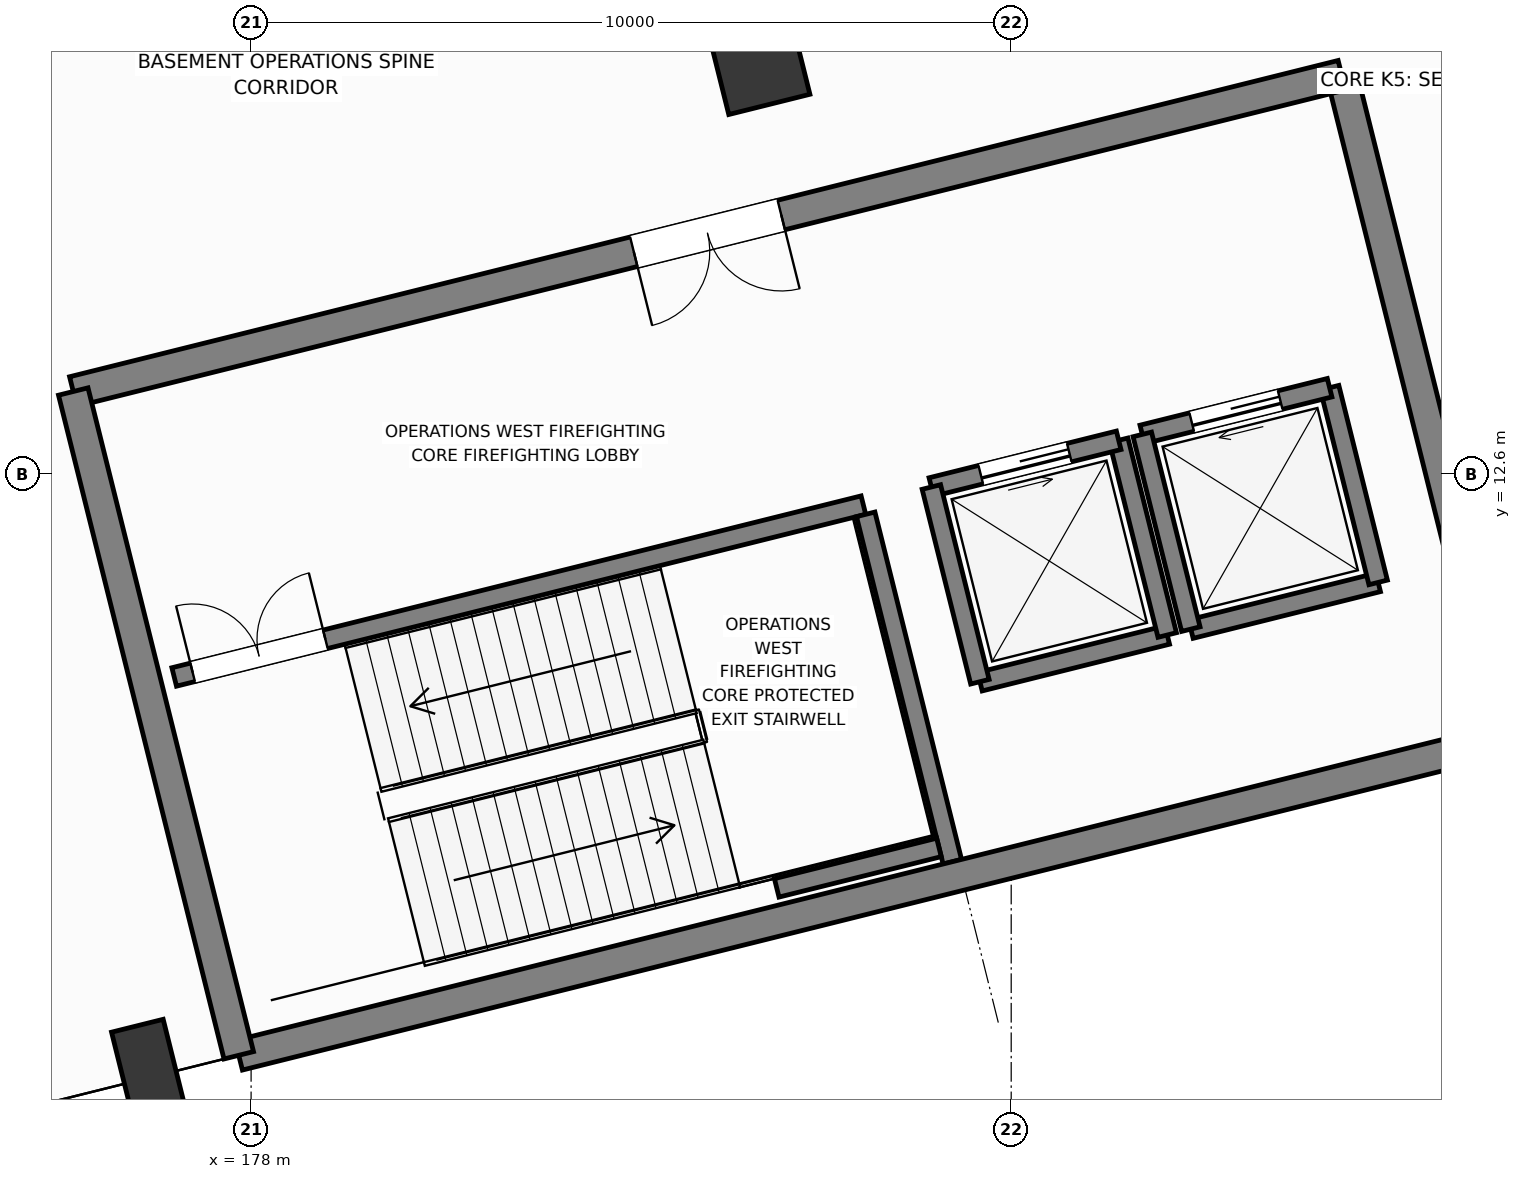
"""IFC4 building model, lengths in metres.
Left out: names, types, materials, properties, quantities, classifications, styles, units other than length and angle.
Written with IfcOpenShell. Run it as: python <this file> out.ifc"""

import sys

from ifc_helpers import new_model, si_unit, direction, frame, frame_2d, origin, origin_2d, place, context, subcontext, project, spatial, rectangle, extrude, element, fill, save


model = new_model("IFC4")
c1 = context("Model", 3, precision=1e-05, world=origin(), true_north=direction((0.0, 1.0)))
c2 = subcontext(c1, "Body", "Model", "MODEL_VIEW")
j1 = project(units=[si_unit("LENGTHUNIT", "METRE"), si_unit("PLANEANGLEUNIT", "RADIAN")], contexts=[c1])
p1 = place(None, origin())
s1 = spatial("IfcSite", under=j1, at=p1, CompositionType="ELEMENT")
p2 = place(p1, origin())
s2 = spatial("IfcBuilding", under=s1, at=p2, CompositionType="ELEMENT")
p3 = place(p2, frame((0.0, 0.0, -5.4)))
s3 = spatial("IfcBuildingStorey", under=s2, at=p3, CompositionType="ELEMENT", Elevation=-5.4)
p4 = place(p3, frame((176.673, 4.661, 0.0), z_axis=(0.0, 0.0, 1.0), x_axis=(0.970295726276, 0.2419218956, 0.0)))
e1 = element("IfcColumn", 1, at=p4, inside=s3, PredefinedType="COLUMN", context=c2, shape_type="SweptSolid", body=[
    extrude(rectangle(XDim=0.7, YDim=1.4, at=origin_2d()), origin(), (0.0, 0.0, 1.0), 5.4),
])
p5 = place(p3, frame((184.685, 17.995, 0.0), z_axis=(0.0, 0.0, 1.0), x_axis=(0.970295726276, 0.2419218956, 0.0)))
e2 = element("IfcColumn", 2, at=p5, inside=s3, PredefinedType="COLUMN", context=c2, shape_type="SweptSolid", body=[
    extrude(rectangle(XDim=1.1, YDim=1.1, at=origin_2d()), origin(), (0.0, 0.0, 1.0), 5.4),
])
p6 = place(p3, frame((187.588, 9.866, 0.0), z_axis=(0.0, 0.0, 1.0), x_axis=(0.97029284861, 0.241933436994, 0.0)))
e3 = element("IfcWall", 3, at=p6, inside=s3, PredefinedType="SOLIDWALL", context=c2, shape_type="SweptSolid", body=[
    extrude(rectangle(XDim=2.54, YDim=0.25, at=frame_2d((1.27, 0.0))), origin(), (0.0, 0.0, 1.0), 5.02),
])
p7 = place(p3, frame((190.053, 10.481, 0.0), z_axis=(0.0, 0.0, 1.0), x_axis=(-0.241938414856, 0.970291607413, 0.0)))
e4 = element("IfcWall", 4, at=p7, inside=s3, PredefinedType="SOLIDWALL", context=c2, shape_type="SweptSolid", body=[
    extrude(rectangle(XDim=2.64, YDim=0.25, at=frame_2d((1.32, 0.0))), origin(), (0.0, 0.0, 1.0), 5.02),
])
p8 = place(p3, frame((189.414, 13.042, 0.0), z_axis=(0.0, 0.0, 1.0), x_axis=(-0.97029284861, -0.241933436994, 0.0)))
e5 = element("IfcWall", 5, at=p8, inside=s3, PredefinedType="SOLIDWALL", context=c2, shape_type="SweptSolid", body=[
    extrude(rectangle(XDim=2.54, YDim=0.25, at=frame_2d((1.27, 0.0))), origin(), (0.0, 0.0, 1.0), 5.02),
])
p9 = place(p8, frame((0.67, 0.0, 0.0)))
e6 = element("IfcOpeningElement", 6, at=p9, cuts=e5, PredefinedType="OPENING", context=c2, shape_type="SweptSolid", body=[
    extrude(rectangle(XDim=1.2, YDim=2.2, at=frame_2d((0.6, 1.1))), frame((0.0, 0.135, 0.0), z_axis=(0.0, -1.0, 0.0), x_axis=(1.0, 0.0, 0.0)), (0.0, 0.0, 1.0), 0.27),
])
p10 = place(p3, frame((186.95, 12.428, 0.0), z_axis=(0.0, 0.0, 1.0), x_axis=(0.241938414856, -0.970291607413, 0.0)))
e7 = element("IfcWall", 7, at=p10, inside=s3, PredefinedType="SOLIDWALL", context=c2, shape_type="SweptSolid", body=[
    extrude(rectangle(XDim=2.64, YDim=0.25, at=frame_2d((1.32, 0.0))), origin(), (0.0, 0.0, 1.0), 5.02),
])
p11 = place(p3, frame((190.363, 10.558, 0.0), z_axis=(0.0, 0.0, 1.0), x_axis=(0.97029284861, 0.241933436994, 0.0)))
e8 = element("IfcWall", 8, at=p11, inside=s3, PredefinedType="SOLIDWALL", context=c2, shape_type="SweptSolid", body=[
    extrude(rectangle(XDim=2.54, YDim=0.25, at=frame_2d((1.27, 0.0))), origin(), (0.0, 0.0, 1.0), 5.02),
])
p12 = place(p3, frame((192.828, 11.173, 0.0), z_axis=(0.0, 0.0, 1.0), x_axis=(-0.241938414856, 0.970291607413, 0.0)))
e9 = element("IfcWall", 9, at=p12, inside=s3, PredefinedType="SOLIDWALL", context=c2, shape_type="SweptSolid", body=[
    extrude(rectangle(XDim=2.64, YDim=0.25, at=frame_2d((1.32, 0.0))), origin(), (0.0, 0.0, 1.0), 5.02),
])
p13 = place(p3, frame((192.189, 13.734, 0.0), z_axis=(0.0, 0.0, 1.0), x_axis=(-0.97029284861, -0.241933436994, 0.0)))
e10 = element("IfcWall", 10, at=p13, inside=s3, PredefinedType="SOLIDWALL", context=c2, shape_type="SweptSolid", body=[
    extrude(rectangle(XDim=2.54, YDim=0.25, at=frame_2d((1.27, 0.0))), origin(), (0.0, 0.0, 1.0), 5.02),
])
p14 = place(p13, frame((0.67, 0.0, 0.0)))
e11 = element("IfcOpeningElement", 11, at=p14, cuts=e10, PredefinedType="OPENING", context=c2, shape_type="SweptSolid", body=[
    extrude(rectangle(XDim=1.2, YDim=2.2, at=frame_2d((0.6, 1.1))), frame((0.0, 0.135, 0.0), z_axis=(0.0, -1.0, 0.0), x_axis=(1.0, 0.0, 0.0)), (0.0, 0.0, 1.0), 0.27),
])
p15 = place(p3, frame((189.725, 13.12, 0.0), z_axis=(0.0, 0.0, 1.0), x_axis=(0.241938414856, -0.970291607413, 0.0)))
e12 = element("IfcWall", 12, at=p15, inside=s3, PredefinedType="SOLIDWALL", context=c2, shape_type="SweptSolid", body=[
    extrude(rectangle(XDim=2.64, YDim=0.25, at=frame_2d((1.32, 0.0))), origin(), (0.0, 0.0, 1.0), 5.02),
])
p16 = place(p3, frame((176.988, 9.929, 0.0), z_axis=(0.0, 0.0, 1.0), x_axis=(0.970297151331, 0.241916179943, 0.0)))
e13 = element("IfcWall", 13, at=p16, inside=s3, PredefinedType="SOLIDWALL", context=c2, shape_type="SweptSolid", body=[
    extrude(rectangle(XDim=9.345, YDim=0.25, at=frame_2d((4.673, 0.0))), origin(), (0.0, 0.0, 1.0), 5.02),
])
p17 = place(p16, frame((0.25, 0.0, 0.0)))
e14 = element("IfcOpeningElement", 14, at=p17, cuts=e13, PredefinedType="OPENING", context=c2, shape_type="SweptSolid", body=[
    extrude(rectangle(XDim=1.8, YDim=2.25, at=frame_2d((0.9, 1.125))), frame((0.0, 0.135, 0.0), z_axis=(0.0, -1.0, 0.0), x_axis=(1.0, 0.0, 0.0)), (0.0, 0.0, 1.0), 0.27),
])
p18 = place(p3, frame((187.225, 7.498, 0.0), z_axis=(0.0, 0.0, 1.0), x_axis=(-0.241911120435, 0.970298412763, 0.0)))
e15 = element("IfcWall", 15, at=p18, inside=s3, PredefinedType="SOLIDWALL", context=c2, shape_type="SweptSolid", body=[
    extrude(rectangle(XDim=4.71, YDim=0.25, at=frame_2d((2.355, 0.0))), origin(), (0.0, 0.0, 1.0), 5.02),
])
p19 = place(p3, frame((184.915, 7.154, 0.0), z_axis=(0.0, 0.0, 1.0), x_axis=(0.97029738597, 0.241915238833, 0.0)))
e16 = element("IfcWall", 16, at=p19, inside=s3, PredefinedType="SOLIDWALL", context=c2, shape_type="SweptSolid", body=[
    extrude(rectangle(XDim=2.2, YDim=0.25, at=frame_2d((1.1, 0.0))), origin(), (0.0, 0.0, 1.0), 5.02),
])
p20 = place(p3, frame((177.838, 4.951, 0.0), z_axis=(0.0, 0.0, 1.0), x_axis=(0.970295179998, 0.241924086589, 0.0)))
e17 = element("IfcWall", 17, at=p20, inside=s3, PredefinedType="SHEAR", context=c2, shape_type="SweptSolid", body=[
    extrude(rectangle(XDim=17.2, YDim=0.4, at=frame_2d((8.6, 0.0))), origin(), (0.0, 0.0, 1.0), 5.02),
])
p21 = place(p3, frame((194.527, 9.113, 0.0), z_axis=(0.0, 0.0, 1.0), x_axis=(-0.241923808098, 0.970295249435, 0.0)))
e18 = element("IfcWall", 18, at=p21, inside=s3, PredefinedType="SHEAR", context=c2, shape_type="SweptSolid", body=[
    extrude(rectangle(XDim=9.0, YDim=0.4, at=frame_2d((4.5, 0.0))), origin(), (0.0, 0.0, 1.0), 5.02),
])
p22 = place(p3, frame((192.349, 17.845, 0.0), z_axis=(0.0, 0.0, 1.0), x_axis=(-0.970296544738, -0.241918612906, 0.0)))
e19 = element("IfcWall", 19, at=p22, inside=s3, PredefinedType="SHEAR", context=c2, shape_type="SweptSolid", body=[
    extrude(rectangle(XDim=17.2, YDim=0.4, at=frame_2d((8.6, 0.0))), origin(), (0.0, 0.0, 1.0), 5.02),
])
p23 = place(p22, frame((7.6, 0.0, 0.0)))
e20 = element("IfcOpeningElement", 20, at=p23, cuts=e19, PredefinedType="OPENING", context=c2, shape_type="SweptSolid", body=[
    extrude(rectangle(XDim=2.0, YDim=2.3, at=frame_2d((1.0, 1.15))), frame((0.0, 0.21, 0.0), z_axis=(0.0, -1.0, 0.0), x_axis=(1.0, 0.0, 0.0)), (0.0, 0.0, 1.0), 0.42),
])
p24 = place(p3, frame((175.66, 13.684, 0.0), z_axis=(0.0, 0.0, 1.0), x_axis=(0.241921199913, -0.97029589973, 0.0)))
e21 = element("IfcWall", 21, at=p24, inside=s3, PredefinedType="SHEAR", context=c2, shape_type="SweptSolid", body=[
    extrude(rectangle(XDim=9.0, YDim=0.4, at=frame_2d((4.5, 0.0))), origin(), (0.0, 0.0, 1.0), 5.02),
])
p25 = place(p9, origin())
e22 = element("IfcDoor", 22, at=p25, inside=s3, OperationType="SLIDING_TO_LEFT", PredefinedType="DOOR", context=c2, shape_type="SweptSolid", body=[
    extrude(rectangle(XDim=1.2, YDim=2.2, at=frame_2d((0.6, 1.1))), frame((0.0, 0.025, 0.0), z_axis=(0.0, -1.0, 0.0), x_axis=(1.0, 0.0, 0.0)), (0.0, 0.0, 1.0), 0.05),
])
fill(e6, e22)
p26 = place(p14, origin())
e23 = element("IfcDoor", 23, at=p26, inside=s3, OperationType="SLIDING_TO_RIGHT", PredefinedType="DOOR", context=c2, shape_type="SweptSolid", body=[
    extrude(rectangle(XDim=1.2, YDim=2.2, at=frame_2d((0.6, 1.1))), frame((0.0, 0.025, 0.0), z_axis=(0.0, -1.0, 0.0), x_axis=(1.0, 0.0, 0.0)), (0.0, 0.0, 1.0), 0.05),
])
fill(e11, e23)
p27 = place(p17, origin())
e24 = element("IfcDoor", 24, at=p27, inside=s3, OperationType="DOUBLE_DOOR_SINGLE_SWING", PredefinedType="DOOR", context=c2, shape_type="SweptSolid", body=[
    extrude(rectangle(XDim=1.8, YDim=2.25, at=frame_2d((0.9, 1.125))), frame((0.0, 0.025, 0.0), z_axis=(0.0, -1.0, 0.0), x_axis=(1.0, 0.0, 0.0)), (0.0, 0.0, 1.0), 0.05),
])
fill(e14, e24)
p28 = place(p23, origin())
e25 = element("IfcDoor", 25, at=p28, inside=s3, OperationType="DOUBLE_DOOR_SINGLE_SWING", PredefinedType="DOOR", context=c2, shape_type="SweptSolid", body=[
    extrude(rectangle(XDim=2.0, YDim=2.3, at=frame_2d((1.0, 1.15))), frame((0.0, 0.025, 0.0), z_axis=(0.0, -1.0, 0.0), x_axis=(1.0, 0.0, 0.0)), (0.0, 0.0, 1.0), 0.05),
])
fill(e20, e25)
save(model, sys.argv[1])
